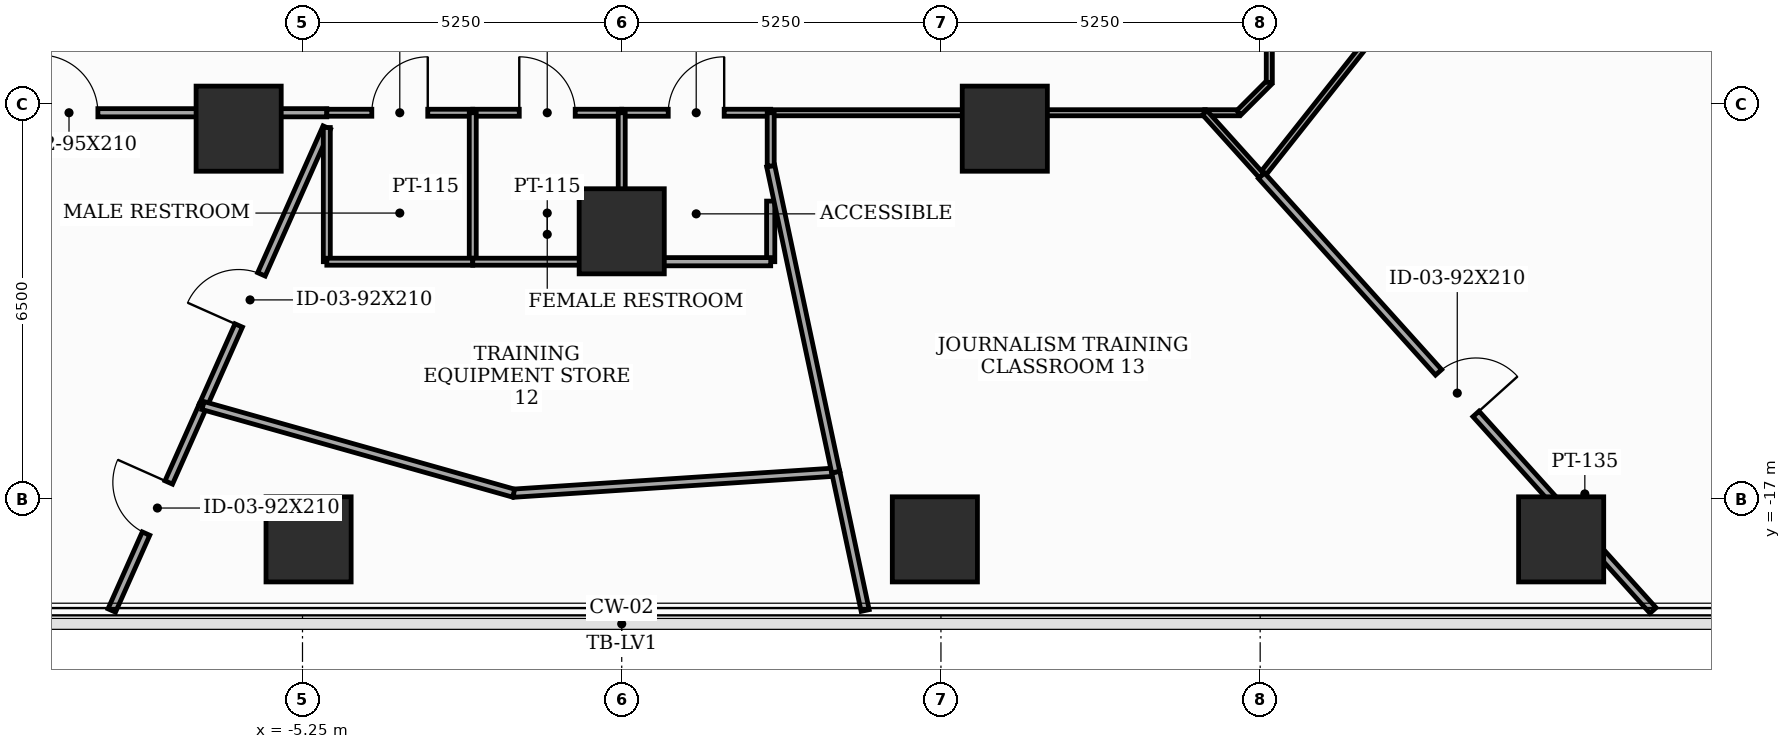
"""IFC4 building model, lengths in metres.
Left out: names, types, materials, properties, quantities, classifications, styles, units other than length and angle.
Written with IfcOpenShell. Run it as: python <this file> out.ifc"""

import sys

from ifc_helpers import new_model, si_unit, direction, frame, frame_2d, origin, origin_2d, place, context, subcontext, project, spatial, rectangle, extrude, element, fill, save


model = new_model("IFC4")
c1 = context("Model", 3, precision=1e-05, world=origin(), true_north=direction((0.0, 1.0)))
c2 = subcontext(c1, "Body", "Model", "MODEL_VIEW")
j1 = project(units=[si_unit("LENGTHUNIT", "METRE"), si_unit("PLANEANGLEUNIT", "RADIAN")], contexts=[c1])
p1 = place(None, origin())
s1 = spatial("IfcSite", under=j1, at=p1, CompositionType="ELEMENT")
p2 = place(p1, origin())
s2 = spatial("IfcBuilding", under=s1, at=p2, CompositionType="ELEMENT")
p3 = place(p2, frame((0.0, 0.0, 48.2)))
s3 = spatial("IfcBuildingStorey", under=s2, at=p3, CompositionType="ELEMENT", Elevation=48.2)
for number, where, z_axis, x_axis in (
    (1, (-6.3, -10.912, 0.0), (0.0, 0.0, 1.0), (1.0, 0.0, 0.0)),
    (2, (0.0, -12.6, 0.0), (0.0, 0.0, 1.0), (1.0, 0.0, 0.0)),
    (3, (6.3, -10.912, 0.0), (0.0, 0.0, 1.0), (1.0, 0.0, 0.0)),
    (4, (-5.15, -17.667, 0.0), (0.0, 0.0, 1.0), (1.0, 0.0, 0.0)),
    (5, (5.15, -17.667, 0.0), (0.0, 0.0, 1.0), (1.0, 0.0, 0.0)),
    (6, (15.45, -17.667, 0.0), (0.0, 0.0, 1.0), (1.0, 0.0, 0.0)),
):
    element("IfcColumn", number, at=place(p3, frame(where, z_axis=z_axis, x_axis=x_axis)), inside=s3, PredefinedType="COLUMN", context=c2, shape_type="SweptSolid", body=[
        extrude(rectangle(XDim=1.4, YDim=1.4, at=origin_2d()), origin(), (0.0, 0.0, 1.0), 3.7),
    ])
p4 = place(p3, frame((9.589, -10.65, 0.0), z_axis=(0.0, 0.0, 1.0), x_axis=(1.0, 0.0, 0.0)))
e7 = element("IfcWall", 7, at=p4, inside=s3, PredefinedType="MOVABLE", context=c2, shape_type="SweptSolid", body=[
    extrude(rectangle(XDim=0.561, YDim=0.1, at=frame_2d((0.28, 0.0))), origin(), (0.0, 0.0, 1.0), 3.5),
])
p5 = place(p3, frame((10.15, -10.65, 0.0), z_axis=(0.0, 0.0, 1.0), x_axis=(0.707106781187, 0.707106781187, 0.0)))
e8 = element("IfcWall", 8, at=p5, inside=s3, PredefinedType="MOVABLE", context=c2, shape_type="SweptSolid", body=[
    extrude(rectangle(XDim=0.707, YDim=0.1, at=frame_2d((0.354, 0.0))), origin(), (0.0, 0.0, 1.0), 3.5),
])
p6 = place(p3, frame((10.65, -10.15, 0.0), z_axis=(0.0, 0.0, 1.0), x_axis=(0.0, 1.0, 0.0)))
e9 = element("IfcWall", 9, at=p6, inside=s3, PredefinedType="MOVABLE", context=c2, shape_type="SweptSolid", body=[
    extrude(rectangle(XDim=6.158, YDim=0.1, at=frame_2d((3.079, 0.0))), origin(), (0.0, 0.0, 1.0), 2.785),
])
p7 = place(p6, frame((0.757, 0.0, 0.0)))
e10 = element("IfcOpeningElement", 10, at=p7, cuts=e9, PredefinedType="OPENING", context=c2, shape_type="SweptSolid", body=[
    extrude(rectangle(XDim=0.95, YDim=2.1, at=frame_2d((0.475, 1.05))), frame((0.0, 0.06, 0.0), z_axis=(0.0, -1.0, 0.0), x_axis=(1.0, 0.0, 0.0)), (0.0, 0.0, 1.0), 0.12),
])
p8 = place(p3, frame((-10.15, -10.65, 0.0), z_axis=(0.0, 0.0, 1.0), x_axis=(1.0, 0.0, 0.0)))
e11 = element("IfcWall", 11, at=p8, inside=s3, PredefinedType="PARTITIONING", context=c2, shape_type="SweptSolid", body=[
    extrude(rectangle(XDim=5.3, YDim=0.135, at=frame_2d((2.65, 0.0))), origin(), (0.0, 0.0, 1.0), 2.785),
])
p9 = place(p8, frame((0.585, 0.0, 0.0)))
e12 = element("IfcOpeningElement", 12, at=p9, cuts=e11, PredefinedType="OPENING", context=c2, shape_type="SweptSolid", body=[
    extrude(rectangle(XDim=0.95, YDim=2.1, at=frame_2d((0.475, 1.05))), frame((0.0, 0.077, 0.0), z_axis=(0.0, -1.0, 0.0), x_axis=(1.0, 0.0, 0.0)), (0.0, 0.0, 1.0), 0.155),
])
p10 = place(p3, frame((-4.85, -10.65, 0.0), z_axis=(0.0, 0.0, 1.0), x_axis=(1.0, 0.0, 0.0)))
e13 = element("IfcWall", 13, at=p10, inside=s3, PredefinedType="PARTITIONING", context=c2, shape_type="SweptSolid", body=[
    extrude(rectangle(XDim=2.4, YDim=0.115, at=frame_2d((1.2, 0.0))), origin(), (0.0, 0.0, 1.0), 3.5),
])
p11 = place(p10, frame((0.74, 0.0, 0.0)))
e14 = element("IfcOpeningElement", 14, at=p11, cuts=e13, PredefinedType="OPENING", context=c2, shape_type="SweptSolid", body=[
    extrude(rectangle(XDim=0.92, YDim=2.1, at=frame_2d((0.46, 1.05))), frame((0.0, 0.067, 0.0), z_axis=(0.0, -1.0, 0.0), x_axis=(1.0, 0.0, 0.0)), (0.0, 0.0, 1.0), 0.135),
])
p12 = place(p3, frame((-2.45, -10.65, 0.0), z_axis=(0.0, 0.0, 1.0), x_axis=(1.0, 0.0, 0.0)))
e15 = element("IfcWall", 15, at=p12, inside=s3, PredefinedType="PARTITIONING", context=c2, shape_type="SweptSolid", body=[
    extrude(rectangle(XDim=2.45, YDim=0.115, at=frame_2d((1.225, 0.0))), origin(), (0.0, 0.0, 1.0), 2.785),
])
p13 = place(p12, frame((0.765, 0.0, 0.0)))
e16 = element("IfcOpeningElement", 16, at=p13, cuts=e15, PredefinedType="OPENING", context=c2, shape_type="SweptSolid", body=[
    extrude(rectangle(XDim=0.92, YDim=2.1, at=frame_2d((0.46, 1.05))), frame((0.0, 0.067, 0.0), z_axis=(0.0, -1.0, 0.0), x_axis=(1.0, 0.0, 0.0)), (0.0, 0.0, 1.0), 0.135),
])
p14 = place(p3, frame((0.0, -10.65, 0.0), z_axis=(0.0, 0.0, 1.0), x_axis=(1.0, 0.0, 0.0)))
e17 = element("IfcWall", 17, at=p14, inside=s3, PredefinedType="PARTITIONING", context=c2, shape_type="SweptSolid", body=[
    extrude(rectangle(XDim=2.45, YDim=0.115, at=frame_2d((1.225, 0.0))), origin(), (0.0, 0.0, 1.0), 3.5),
])
p15 = place(p14, frame((0.765, 0.0, 0.0)))
e18 = element("IfcOpeningElement", 18, at=p15, cuts=e17, PredefinedType="OPENING", context=c2, shape_type="SweptSolid", body=[
    extrude(rectangle(XDim=0.92, YDim=2.1, at=frame_2d((0.46, 1.05))), frame((0.0, 0.067, 0.0), z_axis=(0.0, -1.0, 0.0), x_axis=(1.0, 0.0, 0.0)), (0.0, 0.0, 1.0), 0.135),
])
p16 = place(p3, frame((2.45, -10.65, 0.0), z_axis=(0.0, 0.0, 1.0), x_axis=(1.0, 0.0, 0.0)))
e19 = element("IfcWall", 19, at=p16, inside=s3, PredefinedType="MOVABLE", context=c2, shape_type="SweptSolid", body=[
    extrude(rectangle(XDim=7.139, YDim=0.1, at=frame_2d((3.57, 0.0))), origin(), (0.0, 0.0, 1.0), 2.785),
])
p17 = place(p3, frame((10.522, -11.686, 0.0), z_axis=(0.0, 0.0, 1.0), x_axis=(0.620628051287, 0.784105108997, 0.0)))
e20 = element("IfcWall", 20, at=p17, inside=s3, PredefinedType="MOVABLE", context=c2, shape_type="SweptSolid", body=[
    extrude(rectangle(XDim=5.678, YDim=0.1, at=frame_2d((2.839, 0.0))), origin(), (0.0, 0.0, 1.0), 3.5),
])
p18 = place(p3, frame((9.589, -10.65, 0.0), z_axis=(0.0, 0.0, 1.0), x_axis=(0.669100165698, -0.743172233243, 0.0)))
e21 = element("IfcWall", 21, at=p18, inside=s3, PredefinedType="MOVABLE", context=c2, shape_type="SweptSolid", body=[
    extrude(rectangle(XDim=1.394, YDim=0.1, at=frame_2d((0.697, 0.0))), origin(), (0.0, 0.0, 1.0), 3.5),
])
p19 = place(p3, frame((10.522, -11.686, 0.0), z_axis=(0.0, 0.0, 1.0), x_axis=(0.669132925935, -0.743142736915, 0.0)))
e22 = element("IfcWall", 22, at=p19, inside=s3, PredefinedType="PARTITIONING", context=c2, shape_type="SweptSolid", body=[
    extrude(rectangle(XDim=9.623, YDim=0.135, at=frame_2d((4.811, 0.0))), origin(), (0.0, 0.0, 1.0), 2.935),
])
p20 = place(p19, frame((4.351, 0.0, 0.0)))
e23 = element("IfcOpeningElement", 23, at=p20, cuts=e22, PredefinedType="OPENING", context=c2, shape_type="SweptSolid", body=[
    extrude(rectangle(XDim=0.92, YDim=2.1, at=frame_2d((0.46, 1.05))), frame((0.0, 0.077, 0.0), z_axis=(0.0, -1.0, 0.0), x_axis=(1.0, 0.0, 0.0)), (0.0, 0.0, 1.0), 0.155),
])
p21 = place(p3, frame((-8.387, -18.837, 0.0), z_axis=(0.0, 0.0, 1.0), x_axis=(0.406721597958, 0.913552156012, 0.0)))
e24 = element("IfcWall", 24, at=p21, inside=s3, PredefinedType="PARTITIONING", context=c2, shape_type="SweptSolid", body=[
    extrude(rectangle(XDim=3.69, YDim=0.135, at=frame_2d((1.845, 0.0))), origin(), (0.0, 0.0, 1.0), 2.935),
])
p22 = place(p21, frame((1.385, 0.0, 0.0)))
e25 = element("IfcOpeningElement", 25, at=p22, cuts=e24, PredefinedType="OPENING", context=c2, shape_type="SweptSolid", body=[
    extrude(rectangle(XDim=0.92, YDim=2.1, at=frame_2d((0.46, 1.05))), frame((0.0, 0.077, 0.0), z_axis=(0.0, -1.0, 0.0), x_axis=(1.0, 0.0, 0.0)), (0.0, 0.0, 1.0), 0.155),
])
p23 = place(p3, frame((-6.886, -15.466, 0.0), z_axis=(0.0, 0.0, 1.0), x_axis=(0.406713095633, 0.913555941276, 0.0)))
e26 = element("IfcWall", 26, at=p23, inside=s3, PredefinedType="PARTITIONING", context=c2, shape_type="SweptSolid", body=[
    extrude(rectangle(XDim=5.006, YDim=0.135, at=frame_2d((2.503, 0.0))), origin(), (0.0, 0.0, 1.0), 2.685),
])
p24 = place(p23, frame((1.442, 0.0, 0.0)))
e27 = element("IfcOpeningElement", 27, at=p24, cuts=e26, PredefinedType="OPENING", context=c2, shape_type="SweptSolid", body=[
    extrude(rectangle(XDim=0.92, YDim=2.1, at=frame_2d((0.46, 1.05))), frame((0.0, 0.077, 0.0), z_axis=(0.0, -1.0, 0.0), x_axis=(1.0, 0.0, 0.0)), (0.0, 0.0, 1.0), 0.155),
])
p25 = place(p3, frame((-2.45, -13.1, 0.0), z_axis=(0.0, 0.0, 1.0), x_axis=(0.0, 1.0, 0.0)))
e28 = element("IfcWall", 28, at=p25, inside=s3, PredefinedType="PARTITIONING", context=c2, shape_type="SweptSolid", body=[
    extrude(rectangle(XDim=2.45, YDim=0.115, at=frame_2d((1.225, 0.0))), origin(), (0.0, 0.0, 1.0), 2.785),
])
p26 = place(p3, frame((-4.85, -10.893, 0.0), z_axis=(0.0, 0.0, 1.0), x_axis=(0.0, -1.0, 0.0)))
e29 = element("IfcWall", 29, at=p26, inside=s3, PredefinedType="PARTITIONING", context=c2, shape_type="SweptSolid", body=[
    extrude(rectangle(XDim=2.207, YDim=0.115, at=frame_2d((1.104, 0.0))), origin(), (0.0, 0.0, 1.0), 2.785),
])
p27 = place(p3, frame((-4.85, -13.1, 0.0), z_axis=(0.0, 0.0, 1.0), x_axis=(1.0, 0.0, 0.0)))
e30 = element("IfcWall", 30, at=p27, inside=s3, PredefinedType="PARTITIONING", context=c2, shape_type="SweptSolid", body=[
    extrude(rectangle(XDim=2.4, YDim=0.115, at=frame_2d((1.2, 0.0))), origin(), (0.0, 0.0, 1.0), 3.5),
])
p28 = place(p3, frame((3.52, -16.56, 0.0), z_axis=(0.0, 0.0, 1.0), x_axis=(-0.99786221316, -0.065352915375, 0.0)))
e31 = element("IfcWall", 31, at=p28, inside=s3, PredefinedType="PARTITIONING", context=c2, shape_type="SweptSolid", body=[
    extrude(rectangle(XDim=5.308, YDim=0.135, at=frame_2d((2.654, 0.0))), origin(), (0.0, 0.0, 1.0), 3.5),
])
p29 = place(p3, frame((-1.777, -16.907, 0.0), z_axis=(0.0, 0.0, 1.0), x_axis=(-0.962452140865, 0.271451425757, 0.0)))
e32 = element("IfcWall", 32, at=p29, inside=s3, PredefinedType="PARTITIONING", context=c2, shape_type="SweptSolid", body=[
    extrude(rectangle(XDim=5.308, YDim=0.135, at=frame_2d((2.654, 0.0))), origin(), (0.0, 0.0, 1.0), 2.685),
])
p30 = place(p3, frame((4.003, -18.837, 0.0), z_axis=(0.0, 0.0, 1.0), x_axis=(-0.207680617925, 0.978196688268, 0.0)))
e33 = element("IfcWall", 33, at=p30, inside=s3, PredefinedType="PARTITIONING", context=c2, shape_type="SweptSolid", body=[
    extrude(rectangle(XDim=2.328, YDim=0.135, at=frame_2d((1.164, 0.0))), origin(), (0.0, 0.0, 1.0), 2.935),
])
p31 = place(p3, frame((-2.45, -13.1, 0.0), z_axis=(0.0, 0.0, 1.0), x_axis=(1.0, 0.0, 0.0)))
e34 = element("IfcWall", 34, at=p31, inside=s3, PredefinedType="PARTITIONING", context=c2, shape_type="SweptSolid", body=[
    extrude(rectangle(XDim=2.45, YDim=0.115, at=frame_2d((1.225, 0.0))), origin(), (0.0, 0.0, 1.0), 3.5),
])
p32 = place(p3, frame((0.0, -13.1, 0.0), z_axis=(0.0, 0.0, 1.0), x_axis=(0.0, 1.0, 0.0)))
e35 = element("IfcWall", 35, at=p32, inside=s3, PredefinedType="PARTITIONING", context=c2, shape_type="SweptSolid", body=[
    extrude(rectangle(XDim=2.45, YDim=0.115, at=frame_2d((1.225, 0.0))), origin(), (0.0, 0.0, 1.0), 2.785),
])
p33 = place(p3, frame((2.45, -12.103, 0.0), z_axis=(0.0, 0.0, 1.0), x_axis=(0.0, -1.0, 0.0)))
e36 = element("IfcWall", 36, at=p33, inside=s3, PredefinedType="PARTITIONING", context=c2, shape_type="SweptSolid", body=[
    extrude(rectangle(XDim=0.997, YDim=0.135, at=frame_2d((0.499, 0.0))), origin(), (0.0, 0.0, 1.0), 2.785),
])
p34 = place(p3, frame((2.45, -13.1, 0.0), z_axis=(0.0, 0.0, 1.0), x_axis=(-1.0, 0.0, 0.0)))
e37 = element("IfcWall", 37, at=p34, inside=s3, PredefinedType="PARTITIONING", context=c2, shape_type="SweptSolid", body=[
    extrude(rectangle(XDim=2.45, YDim=0.135, at=frame_2d((1.225, 0.0))), origin(), (0.0, 0.0, 1.0), 3.5),
])
p35 = place(p3, frame((3.52, -16.56, 0.0), z_axis=(0.0, 0.0, 1.0), x_axis=(-0.20791548957, 0.978146793276, 0.0)))
e38 = element("IfcWall", 38, at=p35, inside=s3, PredefinedType="PARTITIONING", context=c2, shape_type="SweptSolid", body=[
    extrude(rectangle(XDim=5.147, YDim=0.135, at=frame_2d((2.573, 0.0))), origin(), (0.0, 0.0, 1.0), 2.785),
])
p36 = place(p3, frame((2.45, -11.526, 0.0), z_axis=(0.0, 0.0, 1.0), x_axis=(0.0, 1.0, 0.0)))
e39 = element("IfcWall", 39, at=p36, inside=s3, PredefinedType="PARTITIONING", context=c2, shape_type="SweptSolid", body=[
    extrude(rectangle(XDim=0.876, YDim=0.115, at=frame_2d((0.438, 0.0))), origin(), (0.0, 0.0, 1.0), 3.5),
])
p37 = place(p9, origin())
e40 = element("IfcDoor", 40, at=p37, inside=s3, OperationType="SINGLE_SWING_LEFT", PredefinedType="DOOR", context=c2, shape_type="SweptSolid", body=[
    extrude(rectangle(XDim=0.95, YDim=2.1, at=frame_2d((0.475, 1.05))), frame((0.0, 0.025, 0.0), z_axis=(0.0, -1.0, 0.0), x_axis=(1.0, 0.0, 0.0)), (0.0, 0.0, 1.0), 0.05),
])
fill(e12, e40)
p38 = place(p11, origin())
e41 = element("IfcDoor", 41, at=p38, inside=s3, OperationType="SINGLE_SWING_RIGHT", PredefinedType="DOOR", context=c2, shape_type="SweptSolid", body=[
    extrude(rectangle(XDim=0.92, YDim=2.1, at=frame_2d((0.46, 1.05))), frame((0.0, 0.025, 0.0), z_axis=(0.0, -1.0, 0.0), x_axis=(1.0, 0.0, 0.0)), (0.0, 0.0, 1.0), 0.05),
])
fill(e14, e41)
p39 = place(p13, origin())
e42 = element("IfcDoor", 42, at=p39, inside=s3, OperationType="SINGLE_SWING_LEFT", PredefinedType="DOOR", context=c2, shape_type="SweptSolid", body=[
    extrude(rectangle(XDim=0.92, YDim=2.1, at=frame_2d((0.46, 1.05))), frame((0.0, 0.025, 0.0), z_axis=(0.0, -1.0, 0.0), x_axis=(1.0, 0.0, 0.0)), (0.0, 0.0, 1.0), 0.05),
])
fill(e16, e42)
p40 = place(p15, origin())
e43 = element("IfcDoor", 43, at=p40, inside=s3, OperationType="SINGLE_SWING_RIGHT", PredefinedType="DOOR", context=c2, shape_type="SweptSolid", body=[
    extrude(rectangle(XDim=0.92, YDim=2.1, at=frame_2d((0.46, 1.05))), frame((0.0, 0.025, 0.0), z_axis=(0.0, -1.0, 0.0), x_axis=(1.0, 0.0, 0.0)), (0.0, 0.0, 1.0), 0.05),
])
fill(e18, e43)
p41 = place(p20, origin())
e44 = element("IfcDoor", 44, at=p41, inside=s3, OperationType="SINGLE_SWING_RIGHT", PredefinedType="DOOR", context=c2, shape_type="SweptSolid", body=[
    extrude(rectangle(XDim=0.92, YDim=2.1, at=frame_2d((0.46, 1.05))), frame((0.0, 0.025, 0.0), z_axis=(0.0, -1.0, 0.0), x_axis=(1.0, 0.0, 0.0)), (0.0, 0.0, 1.0), 0.05),
])
fill(e23, e44)
p42 = place(p22, origin())
e45 = element("IfcDoor", 45, at=p42, inside=s3, OperationType="SINGLE_SWING_RIGHT", PredefinedType="DOOR", context=c2, shape_type="SweptSolid", body=[
    extrude(rectangle(XDim=0.92, YDim=2.1, at=frame_2d((0.46, 1.05))), frame((0.0, 0.025, 0.0), z_axis=(0.0, -1.0, 0.0), x_axis=(1.0, 0.0, 0.0)), (0.0, 0.0, 1.0), 0.05),
])
fill(e25, e45)
p43 = place(p24, origin())
e46 = element("IfcDoor", 46, at=p43, inside=s3, OperationType="SINGLE_SWING_LEFT", PredefinedType="DOOR", context=c2, shape_type="SweptSolid", body=[
    extrude(rectangle(XDim=0.92, YDim=2.1, at=frame_2d((0.46, 1.05))), frame((0.0, 0.025, 0.0), z_axis=(0.0, -1.0, 0.0), x_axis=(1.0, 0.0, 0.0)), (0.0, 0.0, 1.0), 0.05),
])
fill(e27, e46)
save(model, sys.argv[1])
